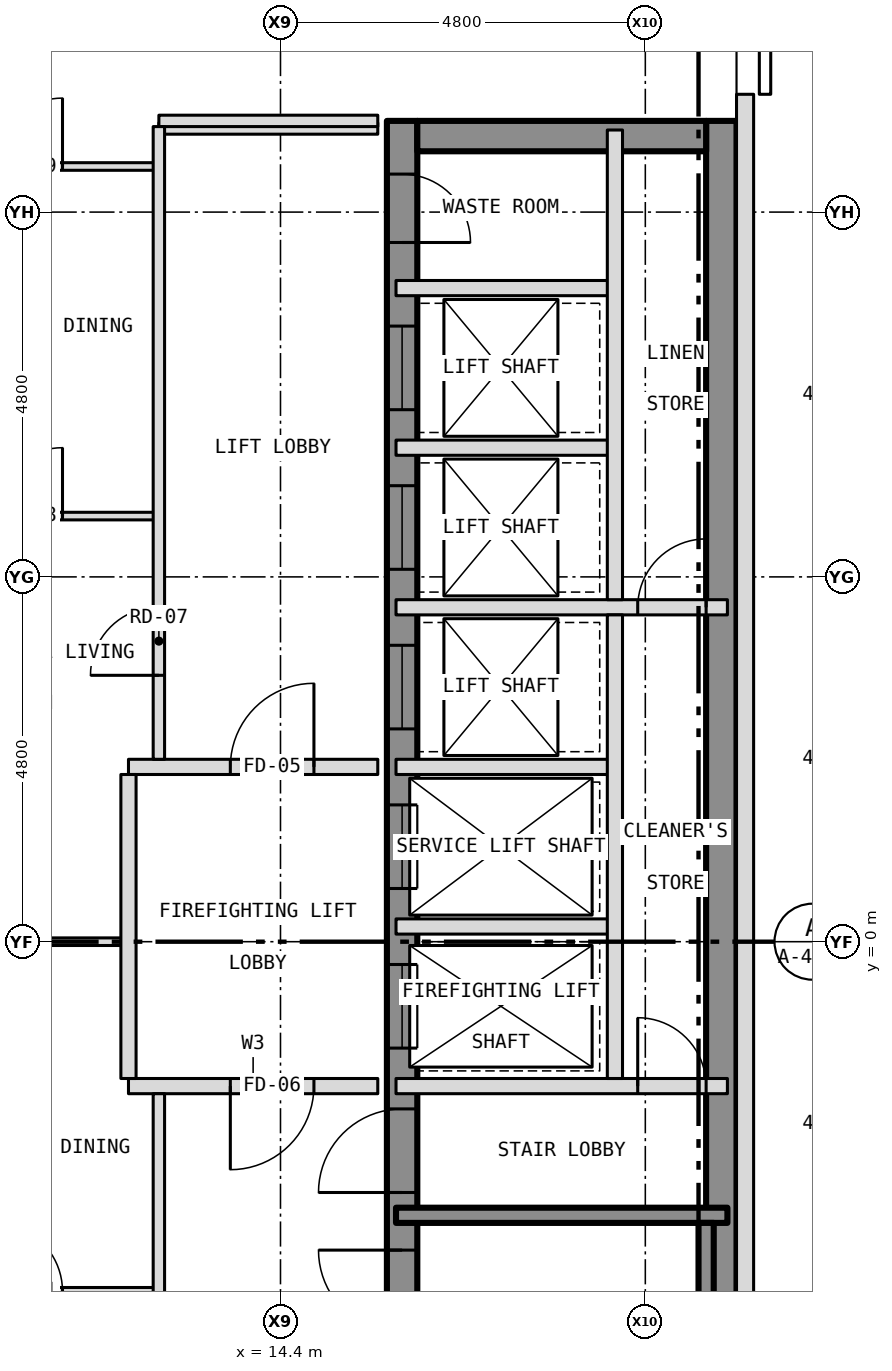
"""IFC4 building model, lengths in metres.
Left out: names, types, materials, properties, quantities, classifications, styles, units other than length and angle.
Written with IfcOpenShell. Run it as: python <this file> out.ifc"""

import sys

from ifc_helpers import new_model, si_unit, direction, frame, frame_2d, origin, place, context, subcontext, project, spatial, rectangle, extrude, element, fill, save


model = new_model("IFC4")
c1 = context("Model", 3, precision=1e-05, world=origin(), true_north=direction((0.0, 1.0)))
c2 = subcontext(c1, "Body", "Model", "MODEL_VIEW")
j1 = project(units=[si_unit("LENGTHUNIT", "METRE"), si_unit("PLANEANGLEUNIT", "RADIAN")], contexts=[c1])
p1 = place(None, origin())
s1 = spatial("IfcSite", under=j1, at=p1, CompositionType="ELEMENT")
p2 = place(p1, origin())
s2 = spatial("IfcBuilding", under=s1, at=p2, CompositionType="ELEMENT")
p3 = place(p2, frame((0.0, 0.0, 276.0)))
s3 = spatial("IfcBuildingStorey", under=s2, at=p3, CompositionType="ELEMENT", Elevation=276.0)
p4 = place(p3, frame((16.0, -10.8, 0.0), z_axis=(0.0, 0.0, 1.0), x_axis=(0.0, 1.0, 0.0)))
e1 = element("IfcWall", 1, at=p4, inside=s3, PredefinedType="SHEAR", context=c2, shape_type="SweptSolid", body=[
    extrude(rectangle(XDim=21.6, YDim=0.4, at=frame_2d((10.8, 0.0))), origin(), (0.0, 0.0, 1.0), 3.25),
])
p5 = place(p4, frame((9.4, 0.0, 0.0)))
e2 = element("IfcOpeningElement", 2, at=p5, cuts=e1, PredefinedType="OPENING", context=c2, shape_type="SweptSolid", body=[
    extrude(rectangle(XDim=1.1, YDim=2.1, at=frame_2d((0.55, 1.05))), frame((0.0, 0.212, 0.0), z_axis=(0.0, -1.0, 0.0), x_axis=(1.0, 0.0, 0.0)), (0.0, 0.0, 1.0), 0.424),
])
p6 = place(p4, frame((11.5, 0.0, 0.0)))
e3 = element("IfcOpeningElement", 3, at=p6, cuts=e1, PredefinedType="OPENING", context=c2, shape_type="SweptSolid", body=[
    extrude(rectangle(XDim=1.1, YDim=2.1, at=frame_2d((0.55, 1.05))), frame((0.0, 0.212, 0.0), z_axis=(0.0, -1.0, 0.0), x_axis=(1.0, 0.0, 0.0)), (0.0, 0.0, 1.0), 0.424),
])
p7 = place(p4, frame((13.6, 0.0, 0.0)))
e4 = element("IfcOpeningElement", 4, at=p7, cuts=e1, PredefinedType="OPENING", context=c2, shape_type="SweptSolid", body=[
    extrude(rectangle(XDim=1.1, YDim=2.1, at=frame_2d((0.55, 1.05))), frame((0.0, 0.212, 0.0), z_axis=(0.0, -1.0, 0.0), x_axis=(1.0, 0.0, 0.0)), (0.0, 0.0, 1.0), 0.424),
])
p8 = place(p4, frame((15.7, 0.0, 0.0)))
e5 = element("IfcOpeningElement", 5, at=p8, cuts=e1, PredefinedType="OPENING", context=c2, shape_type="SweptSolid", body=[
    extrude(rectangle(XDim=1.1, YDim=2.1, at=frame_2d((0.55, 1.05))), frame((0.0, 0.212, 0.0), z_axis=(0.0, -1.0, 0.0), x_axis=(1.0, 0.0, 0.0)), (0.0, 0.0, 1.0), 0.424),
])
p9 = place(p4, frame((17.8, 0.0, 0.0)))
e6 = element("IfcOpeningElement", 6, at=p9, cuts=e1, PredefinedType="OPENING", context=c2, shape_type="SweptSolid", body=[
    extrude(rectangle(XDim=1.1, YDim=2.1, at=frame_2d((0.55, 1.05))), frame((0.0, 0.212, 0.0), z_axis=(0.0, -1.0, 0.0), x_axis=(1.0, 0.0, 0.0)), (0.0, 0.0, 1.0), 0.424),
])
p10 = place(p4, frame((5.642, 0.0, 0.0)))
e7 = element("IfcOpeningElement", 7, at=p10, cuts=e1, PredefinedType="OPENING", context=c2, shape_type="SweptSolid", body=[
    extrude(rectangle(XDim=1.1, YDim=2.1, at=frame_2d((0.55, 1.05))), frame((0.0, 0.212, 0.0), z_axis=(0.0, -1.0, 0.0), x_axis=(1.0, 0.0, 0.0)), (0.0, 0.0, 1.0), 0.424),
])
p11 = place(p4, frame((7.5, 0.0, 0.0)))
e8 = element("IfcOpeningElement", 8, at=p11, cuts=e1, PredefinedType="OPENING", context=c2, shape_type="SweptSolid", body=[
    extrude(rectangle(XDim=1.1, YDim=2.1, at=frame_2d((0.55, 1.05))), frame((0.0, 0.212, 0.0), z_axis=(0.0, -1.0, 0.0), x_axis=(1.0, 0.0, 0.0)), (0.0, 0.0, 1.0), 0.424),
])
p12 = place(p4, frame((20.0, 0.0, 0.0)))
e9 = element("IfcOpeningElement", 9, at=p12, cuts=e1, PredefinedType="OPENING", context=c2, shape_type="SweptSolid", body=[
    extrude(rectangle(XDim=0.9, YDim=2.1, at=frame_2d((0.45, 1.05))), frame((0.0, 0.212, 0.0), z_axis=(0.0, -1.0, 0.0), x_axis=(1.0, 0.0, 0.0)), (0.0, 0.0, 1.0), 0.424),
])
p13 = place(p3, frame((20.2, -10.8, 0.0), z_axis=(0.0, 0.0, 1.0), x_axis=(0.0, 1.0, 0.0)))
e10 = element("IfcWall", 10, at=p13, inside=s3, PredefinedType="SHEAR", context=c2, shape_type="SweptSolid", body=[
    extrude(rectangle(XDim=21.6, YDim=0.4, at=frame_2d((10.8, 0.0))), origin(), (0.0, 0.0, 1.0), 3.25),
])
p14 = place(p3, frame((16.2, 10.6, 0.0), z_axis=(0.0, 0.0, 1.0), x_axis=(1.0, 0.0, 0.0)))
e11 = element("IfcWall", 11, at=p14, inside=s3, PredefinedType="SHEAR", context=c2, shape_type="SweptSolid", body=[
    extrude(rectangle(XDim=3.8, YDim=0.4, at=frame_2d((1.9, 0.0))), origin(), (0.0, 0.0, 1.0), 3.25),
])
p15 = place(p3, frame((20.512, -11.15, 0.0), z_axis=(0.0, 0.0, 1.0), x_axis=(0.0, 1.0, 0.0)))
e12 = element("IfcWall", 12, at=p15, inside=s3, PredefinedType="SOLIDWALL", context=c2, shape_type="SweptSolid", body=[
    extrude(rectangle(XDim=22.3, YDim=0.225, at=frame_2d((11.15, 0.0))), origin(), (0.0, 0.0, 1.0), 3.5),
])
p16 = place(p15, frame((3.3, 0.0, 1.0)))
e13 = element("IfcOpeningElement", 13, at=p16, cuts=e12, PredefinedType="OPENING", context=c2, shape_type="SweptSolid", body=[
    extrude(rectangle(XDim=0.6, YDim=1.5, at=frame_2d((0.3, 0.75))), frame((0.0, 0.125, 0.0), z_axis=(0.0, -1.0, 0.0), x_axis=(1.0, 0.0, 0.0)), (0.0, 0.0, 1.0), 0.249),
])
p17 = place(p3, frame((9.035, -4.6, 0.0), z_axis=(0.0, 0.0, 1.0), x_axis=(1.0, 0.0, 0.0)))
e14 = element("IfcWall", 14, at=p17, inside=s3, PredefinedType="PARTITIONING", context=c2, shape_type="SweptSolid", body=[
    extrude(rectangle(XDim=3.765, YDim=0.1, at=frame_2d((1.883, 0.0))), origin(), (0.0, 0.0, 1.0), 3.35),
])
p18 = place(p17, frame((1.597, 0.0, 0.0)))
e15 = element("IfcOpeningElement", 15, at=p18, cuts=e14, PredefinedType="OPENING", context=c2, shape_type="SweptSolid", body=[
    extrude(rectangle(XDim=0.9, YDim=2.1, at=frame_2d((0.45, 1.05))), frame((0.0, 0.062, 0.0), z_axis=(0.0, -1.0, 0.0), x_axis=(1.0, 0.0, 0.0)), (0.0, 0.0, 1.0), 0.124),
])
p19 = place(p3, frame((15.92, -3.6, 0.0), z_axis=(0.0, 0.0, 1.0), x_axis=(1.0, 0.0, 0.0)))
e16 = element("IfcWall", 16, at=p19, inside=s3, PredefinedType="SHEAR", context=c2, shape_type="SweptSolid", body=[
    extrude(rectangle(XDim=4.36, YDim=0.2, at=frame_2d((2.18, 0.0))), origin(), (0.0, 0.0, 1.0), 3.25),
])
p20 = place(p3, frame((12.4, -1.9, 0.0), z_axis=(0.0, 0.0, 1.0), x_axis=(1.0, 0.0, 0.0)))
e17 = element("IfcWall", 17, at=p20, inside=s3, PredefinedType="PARTITIONING", context=c2, shape_type="SweptSolid", body=[
    extrude(rectangle(XDim=3.28, YDim=0.2, at=frame_2d((1.64, 0.0))), origin(), (0.0, 0.0, 1.0), 3.35),
])
p21 = place(p20, frame((1.34, 0.0, 0.0)))
e18 = element("IfcOpeningElement", 18, at=p21, cuts=e17, PredefinedType="OPENING", context=c2, shape_type="SweptSolid", body=[
    extrude(rectangle(XDim=1.1, YDim=2.1, at=frame_2d((0.55, 1.05))), frame((0.0, 0.112, 0.0), z_axis=(0.0, -1.0, 0.0), x_axis=(1.0, 0.0, 0.0)), (0.0, 0.0, 1.0), 0.224),
])
p22 = place(p3, frame((15.92, -1.9, 0.0), z_axis=(0.0, 0.0, 1.0), x_axis=(1.0, 0.0, 0.0)))
e19 = element("IfcWall", 19, at=p22, inside=s3, PredefinedType="PARTITIONING", context=c2, shape_type="SweptSolid", body=[
    extrude(rectangle(XDim=4.36, YDim=0.2, at=frame_2d((2.18, 0.0))), origin(), (0.0, 0.0, 1.0), 3.25),
])
p23 = place(p22, frame((3.18, 0.0, 0.0)))
e20 = element("IfcOpeningElement", 20, at=p23, cuts=e19, PredefinedType="OPENING", context=c2, shape_type="SweptSolid", body=[
    extrude(rectangle(XDim=0.9, YDim=2.1, at=frame_2d((0.45, 1.05))), frame((0.0, 0.112, 0.0), z_axis=(0.0, -1.0, 0.0), x_axis=(1.0, 0.0, 0.0)), (0.0, 0.0, 1.0), 0.224),
])
p24 = place(p3, frame((9.485, 0.0, 0.0), z_axis=(0.0, 0.0, 1.0), x_axis=(1.0, 0.0, 0.0)))
e21 = element("IfcWall", 21, at=p24, inside=s3, PredefinedType="PARTITIONING", context=c2, shape_type="SweptSolid", body=[
    extrude(rectangle(XDim=2.915, YDim=0.1, at=frame_2d((1.458, 0.0))), origin(), (0.0, 0.0, 1.0), 2.728),
])
p25 = place(p3, frame((15.92, 0.2, 0.0), z_axis=(0.0, 0.0, 1.0), x_axis=(1.0, 0.0, 0.0)))
e22 = element("IfcWall", 22, at=p25, inside=s3, PredefinedType="PARTITIONING", context=c2, shape_type="SweptSolid", body=[
    extrude(rectangle(XDim=2.88, YDim=0.2, at=frame_2d((1.44, 0.0))), origin(), (0.0, 0.0, 1.0), 3.25),
])
p26 = place(p3, frame((12.4, 2.3, 0.0), z_axis=(0.0, 0.0, 1.0), x_axis=(1.0, 0.0, 0.0)))
e23 = element("IfcWall", 23, at=p26, inside=s3, PredefinedType="PARTITIONING", context=c2, shape_type="SweptSolid", body=[
    extrude(rectangle(XDim=3.28, YDim=0.2, at=frame_2d((1.64, 0.0))), origin(), (0.0, 0.0, 1.0), 3.35),
])
p27 = place(p26, frame((1.34, 0.0, 0.0)))
e24 = element("IfcOpeningElement", 24, at=p27, cuts=e23, PredefinedType="OPENING", context=c2, shape_type="SweptSolid", body=[
    extrude(rectangle(XDim=1.1, YDim=2.1, at=frame_2d((0.55, 1.05))), frame((0.0, 0.112, 0.0), z_axis=(0.0, -1.0, 0.0), x_axis=(1.0, 0.0, 0.0)), (0.0, 0.0, 1.0), 0.224),
])
p28 = place(p3, frame((15.92, 2.3, 0.0), z_axis=(0.0, 0.0, 1.0), x_axis=(1.0, 0.0, 0.0)))
e25 = element("IfcWall", 25, at=p28, inside=s3, PredefinedType="PARTITIONING", context=c2, shape_type="SweptSolid", body=[
    extrude(rectangle(XDim=2.88, YDim=0.2, at=frame_2d((1.44, 0.0))), origin(), (0.0, 0.0, 1.0), 3.25),
])
p29 = place(p3, frame((15.92, 4.4, 0.0), z_axis=(0.0, 0.0, 1.0), x_axis=(1.0, 0.0, 0.0)))
e26 = element("IfcWall", 26, at=p29, inside=s3, PredefinedType="PARTITIONING", context=c2, shape_type="SweptSolid", body=[
    extrude(rectangle(XDim=4.36, YDim=0.2, at=frame_2d((2.18, 0.0))), origin(), (0.0, 0.0, 1.0), 3.25),
])
p30 = place(p29, frame((3.18, 0.0, 0.0)))
e27 = element("IfcOpeningElement", 27, at=p30, cuts=e26, PredefinedType="OPENING", context=c2, shape_type="SweptSolid", body=[
    extrude(rectangle(XDim=0.9, YDim=2.1, at=frame_2d((0.45, 1.05))), frame((0.0, 0.112, 0.0), z_axis=(0.0, -1.0, 0.0), x_axis=(1.0, 0.0, 0.0)), (0.0, 0.0, 1.0), 0.224),
])
p31 = place(p3, frame((9.035, 5.6, 0.0), z_axis=(0.0, 0.0, 1.0), x_axis=(1.0, 0.0, 0.0)))
e28 = element("IfcWall", 28, at=p31, inside=s3, PredefinedType="PARTITIONING", context=c2, shape_type="SweptSolid", body=[
    extrude(rectangle(XDim=3.765, YDim=0.1, at=frame_2d((1.883, 0.0))), origin(), (0.0, 0.0, 1.0), 3.35),
])
p32 = place(p31, frame((1.597, 0.0, 0.0)))
e29 = element("IfcOpeningElement", 29, at=p32, cuts=e28, PredefinedType="OPENING", context=c2, shape_type="SweptSolid", body=[
    extrude(rectangle(XDim=0.9, YDim=2.1, at=frame_2d((0.45, 1.05))), frame((0.0, 0.062, 0.0), z_axis=(0.0, -1.0, 0.0), x_axis=(1.0, 0.0, 0.0)), (0.0, 0.0, 1.0), 0.124),
])
for number, where, z_axis, x_axis in (
    (30, (15.92, 6.5, 0.0), (0.0, 0.0, 1.0), (1.0, 0.0, 0.0)),
    (31, (15.92, 8.6, 0.0), (0.0, 0.0, 1.0), (1.0, 0.0, 0.0)),
):
    element("IfcWall", number, at=place(p3, frame(where, z_axis=z_axis, x_axis=x_axis)), inside=s3, PredefinedType="PARTITIONING", context=c2, shape_type="SweptSolid", body=[
        extrude(rectangle(XDim=2.88, YDim=0.2, at=frame_2d((1.44, 0.0))), origin(), (0.0, 0.0, 1.0), 3.25),
    ])
p33 = place(p3, frame((9.035, 10.2, 0.0), z_axis=(0.0, 0.0, 1.0), x_axis=(1.0, 0.0, 0.0)))
e32 = element("IfcWall", 32, at=p33, inside=s3, PredefinedType="PARTITIONING", context=c2, shape_type="SweptSolid", body=[
    extrude(rectangle(XDim=3.765, YDim=0.1, at=frame_2d((1.883, 0.0))), origin(), (0.0, 0.0, 1.0), 3.35),
])
p34 = place(p33, frame((1.597, 0.0, 0.0)))
e33 = element("IfcOpeningElement", 33, at=p34, cuts=e32, PredefinedType="OPENING", context=c2, shape_type="SweptSolid", body=[
    extrude(rectangle(XDim=0.9, YDim=2.1, at=frame_2d((0.45, 1.05))), frame((0.0, 0.062, 0.0), z_axis=(0.0, -1.0, 0.0), x_axis=(1.0, 0.0, 0.0)), (0.0, 0.0, 1.0), 0.124),
])
for number, where, z_axis, x_axis in (
    (34, (12.8, 10.7, 0.0), (0.0, 0.0, 1.0), (1.0, 0.0, 0.0)),
    (35, (12.8, 10.8, 0.0), (0.0, 0.0, 1.0), (1.0, 0.0, 0.0)),
):
    element("IfcWall", number, at=place(p3, frame(where, z_axis=z_axis, x_axis=x_axis)), inside=s3, PredefinedType="PARTITIONING", context=c2, shape_type="SweptSolid", body=[
        extrude(rectangle(XDim=2.88, YDim=0.15, at=frame_2d((1.44, 0.0))), origin(), (0.0, 0.0, 1.0), 3.35),
    ])
p35 = place(p3, frame((12.4, -1.8, 0.0), z_axis=(0.0, 0.0, 1.0), x_axis=(0.0, 1.0, 0.0)))
e36 = element("IfcWall", 36, at=p35, inside=s3, PredefinedType="PARTITIONING", context=c2, shape_type="SweptSolid", body=[
    extrude(rectangle(XDim=4.0, YDim=0.2, at=frame_2d((2.0, 0.0))), origin(), (0.0, 0.0, 1.0), 3.35),
])
p36 = place(p3, frame((12.8, -10.725, 0.0), z_axis=(0.0, 0.0, 1.0), x_axis=(0.0, 1.0, 0.0)))
e37 = element("IfcWall", 37, at=p36, inside=s3, PredefinedType="PARTITIONING", context=c2, shape_type="SweptSolid", body=[
    extrude(rectangle(XDim=8.725, YDim=0.15, at=frame_2d((4.363, 0.0))), origin(), (0.0, 0.0, 1.0), 3.35),
])
p37 = place(p36, frame((2.88, 0.0, 0.0)))
e38 = element("IfcOpeningElement", 38, at=p37, cuts=e37, PredefinedType="OPENING", context=c2, shape_type="SweptSolid", body=[
    extrude(rectangle(XDim=0.9, YDim=2.1, at=frame_2d((0.45, 1.05))), frame((0.0, 0.087, 0.0), z_axis=(0.0, -1.0, 0.0), x_axis=(1.0, 0.0, 0.0)), (0.0, 0.0, 1.0), 0.174),
])
p38 = place(p3, frame((12.8, 2.4, 0.0), z_axis=(0.0, 0.0, 1.0), x_axis=(0.0, 1.0, 0.0)))
e39 = element("IfcWall", 39, at=p38, inside=s3, PredefinedType="PARTITIONING", context=c2, shape_type="SweptSolid", body=[
    extrude(rectangle(XDim=8.325, YDim=0.15, at=frame_2d((4.163, 0.0))), origin(), (0.0, 0.0, 1.0), 3.35),
])
p39 = place(p38, frame((1.105, 0.0, 0.0)))
e40 = element("IfcOpeningElement", 40, at=p39, cuts=e39, PredefinedType="OPENING", context=c2, shape_type="SweptSolid", body=[
    extrude(rectangle(XDim=0.9, YDim=2.1, at=frame_2d((0.45, 1.05))), frame((0.0, 0.087, 0.0), z_axis=(0.0, -1.0, 0.0), x_axis=(1.0, 0.0, 0.0)), (0.0, 0.0, 1.0), 0.174),
])
p40 = place(p3, frame((18.8, -1.8, 0.0), z_axis=(0.0, 0.0, 1.0), x_axis=(0.0, 1.0, 0.0)))
e41 = element("IfcWall", 41, at=p40, inside=s3, PredefinedType="PARTITIONING", context=c2, shape_type="SweptSolid", body=[
    extrude(rectangle(XDim=6.1, YDim=0.2, at=frame_2d((3.05, 0.0))), origin(), (0.0, 0.0, 1.0), 3.25),
])
p41 = place(p3, frame((18.8, 4.5, 0.0), z_axis=(0.0, 0.0, 1.0), x_axis=(0.0, 1.0, 0.0)))
e42 = element("IfcWall", 42, at=p41, inside=s3, PredefinedType="PARTITIONING", context=c2, shape_type="SweptSolid", body=[
    extrude(rectangle(XDim=6.18, YDim=0.2, at=frame_2d((3.09, 0.0))), origin(), (0.0, 0.0, 1.0), 3.25),
])
p42 = place(p3, frame((20.0, -10.68, 0.0), z_axis=(0.0, 0.0, 1.0), x_axis=(0.0, 1.0, 0.0)))
e43 = element("IfcWall", 43, at=p42, inside=s3, PredefinedType="SHEAR", context=c2, shape_type="SweptSolid", body=[
    extrude(rectangle(XDim=6.98, YDim=0.2, at=frame_2d((3.49, 0.0))), origin(), (0.0, 0.0, 1.0), 3.25),
])
p43 = place(p5, origin())
e44 = element("IfcDoor", 44, at=p43, inside=s3, OperationType="SLIDING_TO_LEFT", PredefinedType="DOOR", context=c2, shape_type="SweptSolid", body=[
    extrude(rectangle(XDim=1.1, YDim=2.1, at=frame_2d((0.55, 1.05))), frame((0.0, 0.025, 0.0), z_axis=(0.0, -1.0, 0.0), x_axis=(1.0, 0.0, 0.0)), (0.0, 0.0, 1.0), 0.05),
])
fill(e2, e44)
p44 = place(p6, origin())
e45 = element("IfcDoor", 45, at=p44, inside=s3, OperationType="SLIDING_TO_LEFT", PredefinedType="DOOR", context=c2, shape_type="SweptSolid", body=[
    extrude(rectangle(XDim=1.1, YDim=2.1, at=frame_2d((0.55, 1.05))), frame((0.0, 0.025, 0.0), z_axis=(0.0, -1.0, 0.0), x_axis=(1.0, 0.0, 0.0)), (0.0, 0.0, 1.0), 0.05),
])
fill(e3, e45)
p45 = place(p7, origin())
e46 = element("IfcDoor", 46, at=p45, inside=s3, OperationType="SLIDING_TO_LEFT", PredefinedType="DOOR", context=c2, shape_type="SweptSolid", body=[
    extrude(rectangle(XDim=1.1, YDim=2.1, at=frame_2d((0.55, 1.05))), frame((0.0, 0.025, 0.0), z_axis=(0.0, -1.0, 0.0), x_axis=(1.0, 0.0, 0.0)), (0.0, 0.0, 1.0), 0.05),
])
fill(e4, e46)
p46 = place(p8, origin())
e47 = element("IfcDoor", 47, at=p46, inside=s3, OperationType="SLIDING_TO_LEFT", PredefinedType="DOOR", context=c2, shape_type="SweptSolid", body=[
    extrude(rectangle(XDim=1.1, YDim=2.1, at=frame_2d((0.55, 1.05))), frame((0.0, 0.025, 0.0), z_axis=(0.0, -1.0, 0.0), x_axis=(1.0, 0.0, 0.0)), (0.0, 0.0, 1.0), 0.05),
])
fill(e5, e47)
p47 = place(p9, origin())
e48 = element("IfcDoor", 48, at=p47, inside=s3, OperationType="SLIDING_TO_LEFT", PredefinedType="DOOR", context=c2, shape_type="SweptSolid", body=[
    extrude(rectangle(XDim=1.1, YDim=2.1, at=frame_2d((0.55, 1.05))), frame((0.0, 0.025, 0.0), z_axis=(0.0, -1.0, 0.0), x_axis=(1.0, 0.0, 0.0)), (0.0, 0.0, 1.0), 0.05),
])
fill(e6, e48)
p48 = place(p10, origin())
e49 = element("IfcDoor", 49, at=p48, inside=s3, OperationType="SINGLE_SWING_RIGHT", PredefinedType="DOOR", context=c2, shape_type="SweptSolid", body=[
    extrude(rectangle(XDim=1.1, YDim=2.1, at=frame_2d((0.55, 1.05))), frame((0.0, 0.025, 0.0), z_axis=(0.0, -1.0, 0.0), x_axis=(1.0, 0.0, 0.0)), (0.0, 0.0, 1.0), 0.05),
])
fill(e7, e49)
p49 = place(p11, origin())
e50 = element("IfcDoor", 50, at=p49, inside=s3, OperationType="SINGLE_SWING_LEFT", PredefinedType="DOOR", context=c2, shape_type="SweptSolid", body=[
    extrude(rectangle(XDim=1.1, YDim=2.1, at=frame_2d((0.55, 1.05))), frame((0.0, 0.025, 0.0), z_axis=(0.0, -1.0, 0.0), x_axis=(1.0, 0.0, 0.0)), (0.0, 0.0, 1.0), 0.05),
])
fill(e8, e50)
p50 = place(p12, origin())
e51 = element("IfcDoor", 51, at=p50, inside=s3, OperationType="SINGLE_SWING_LEFT", PredefinedType="DOOR", context=c2, shape_type="SweptSolid", body=[
    extrude(rectangle(XDim=0.9, YDim=2.1, at=frame_2d((0.45, 1.05))), frame((0.0, 0.025, 0.0), z_axis=(0.0, -1.0, 0.0), x_axis=(1.0, 0.0, 0.0)), (0.0, 0.0, 1.0), 0.05),
])
fill(e9, e51)
p51 = place(p23, origin())
e52 = element("IfcDoor", 52, at=p51, inside=s3, OperationType="SINGLE_SWING_LEFT", PredefinedType="DOOR", context=c2, shape_type="SweptSolid", body=[
    extrude(rectangle(XDim=0.9, YDim=2.1, at=frame_2d((0.45, 1.05))), frame((0.0, 0.025, 0.0), z_axis=(0.0, -1.0, 0.0), x_axis=(1.0, 0.0, 0.0)), (0.0, 0.0, 1.0), 0.05),
])
fill(e20, e52)
p52 = place(p30, origin())
e53 = element("IfcDoor", 53, at=p52, inside=s3, OperationType="SINGLE_SWING_RIGHT", PredefinedType="DOOR", context=c2, shape_type="SweptSolid", body=[
    extrude(rectangle(XDim=0.9, YDim=2.1, at=frame_2d((0.45, 1.05))), frame((0.0, 0.025, 0.0), z_axis=(0.0, -1.0, 0.0), x_axis=(1.0, 0.0, 0.0)), (0.0, 0.0, 1.0), 0.05),
])
fill(e27, e53)
p53 = place(p27, origin())
e54 = element("IfcDoor", 54, at=p53, inside=s3, OperationType="SINGLE_SWING_RIGHT", PredefinedType="DOOR", context=c2, shape_type="SweptSolid", body=[
    extrude(rectangle(XDim=1.1, YDim=2.1, at=frame_2d((0.55, 1.05))), frame((0.0, 0.025, 0.0), z_axis=(0.0, -1.0, 0.0), x_axis=(1.0, 0.0, 0.0)), (0.0, 0.0, 1.0), 0.05),
])
fill(e24, e54)
p54 = place(p21, origin())
e55 = element("IfcDoor", 55, at=p54, inside=s3, OperationType="SINGLE_SWING_LEFT", PredefinedType="DOOR", context=c2, shape_type="SweptSolid", body=[
    extrude(rectangle(XDim=1.1, YDim=2.1, at=frame_2d((0.55, 1.05))), frame((0.0, 0.025, 0.0), z_axis=(0.0, -1.0, 0.0), x_axis=(1.0, 0.0, 0.0)), (0.0, 0.0, 1.0), 0.05),
])
fill(e18, e55)
p55 = place(p39, origin())
e56 = element("IfcDoor", 56, at=p55, inside=s3, OperationType="SINGLE_SWING_LEFT", PredefinedType="DOOR", context=c2, shape_type="SweptSolid", body=[
    extrude(rectangle(XDim=0.9, YDim=2.1, at=frame_2d((0.45, 1.05))), frame((0.0, 0.025, 0.0), z_axis=(0.0, -1.0, 0.0), x_axis=(1.0, 0.0, 0.0)), (0.0, 0.0, 1.0), 0.05),
])
fill(e40, e56)
p56 = place(p32, origin())
e57 = element("IfcDoor", 57, at=p56, inside=s3, OperationType="SINGLE_SWING_RIGHT", PredefinedType="DOOR", context=c2, shape_type="SweptSolid", body=[
    extrude(rectangle(XDim=0.9, YDim=2.1, at=frame_2d((0.45, 1.05))), frame((0.0, 0.025, 0.0), z_axis=(0.0, -1.0, 0.0), x_axis=(1.0, 0.0, 0.0)), (0.0, 0.0, 1.0), 0.05),
])
fill(e29, e57)
p57 = place(p34, origin())
e58 = element("IfcDoor", 58, at=p57, inside=s3, OperationType="SINGLE_SWING_RIGHT", PredefinedType="DOOR", context=c2, shape_type="SweptSolid", body=[
    extrude(rectangle(XDim=0.9, YDim=2.1, at=frame_2d((0.45, 1.05))), frame((0.0, 0.025, 0.0), z_axis=(0.0, -1.0, 0.0), x_axis=(1.0, 0.0, 0.0)), (0.0, 0.0, 1.0), 0.05),
])
fill(e33, e58)
p58 = place(p18, origin())
e59 = element("IfcDoor", 59, at=p58, inside=s3, OperationType="SINGLE_SWING_LEFT", PredefinedType="DOOR", context=c2, shape_type="SweptSolid", body=[
    extrude(rectangle(XDim=0.9, YDim=2.1, at=frame_2d((0.45, 1.05))), frame((0.0, 0.025, 0.0), z_axis=(0.0, -1.0, 0.0), x_axis=(1.0, 0.0, 0.0)), (0.0, 0.0, 1.0), 0.05),
])
fill(e15, e59)
save(model, sys.argv[1])
